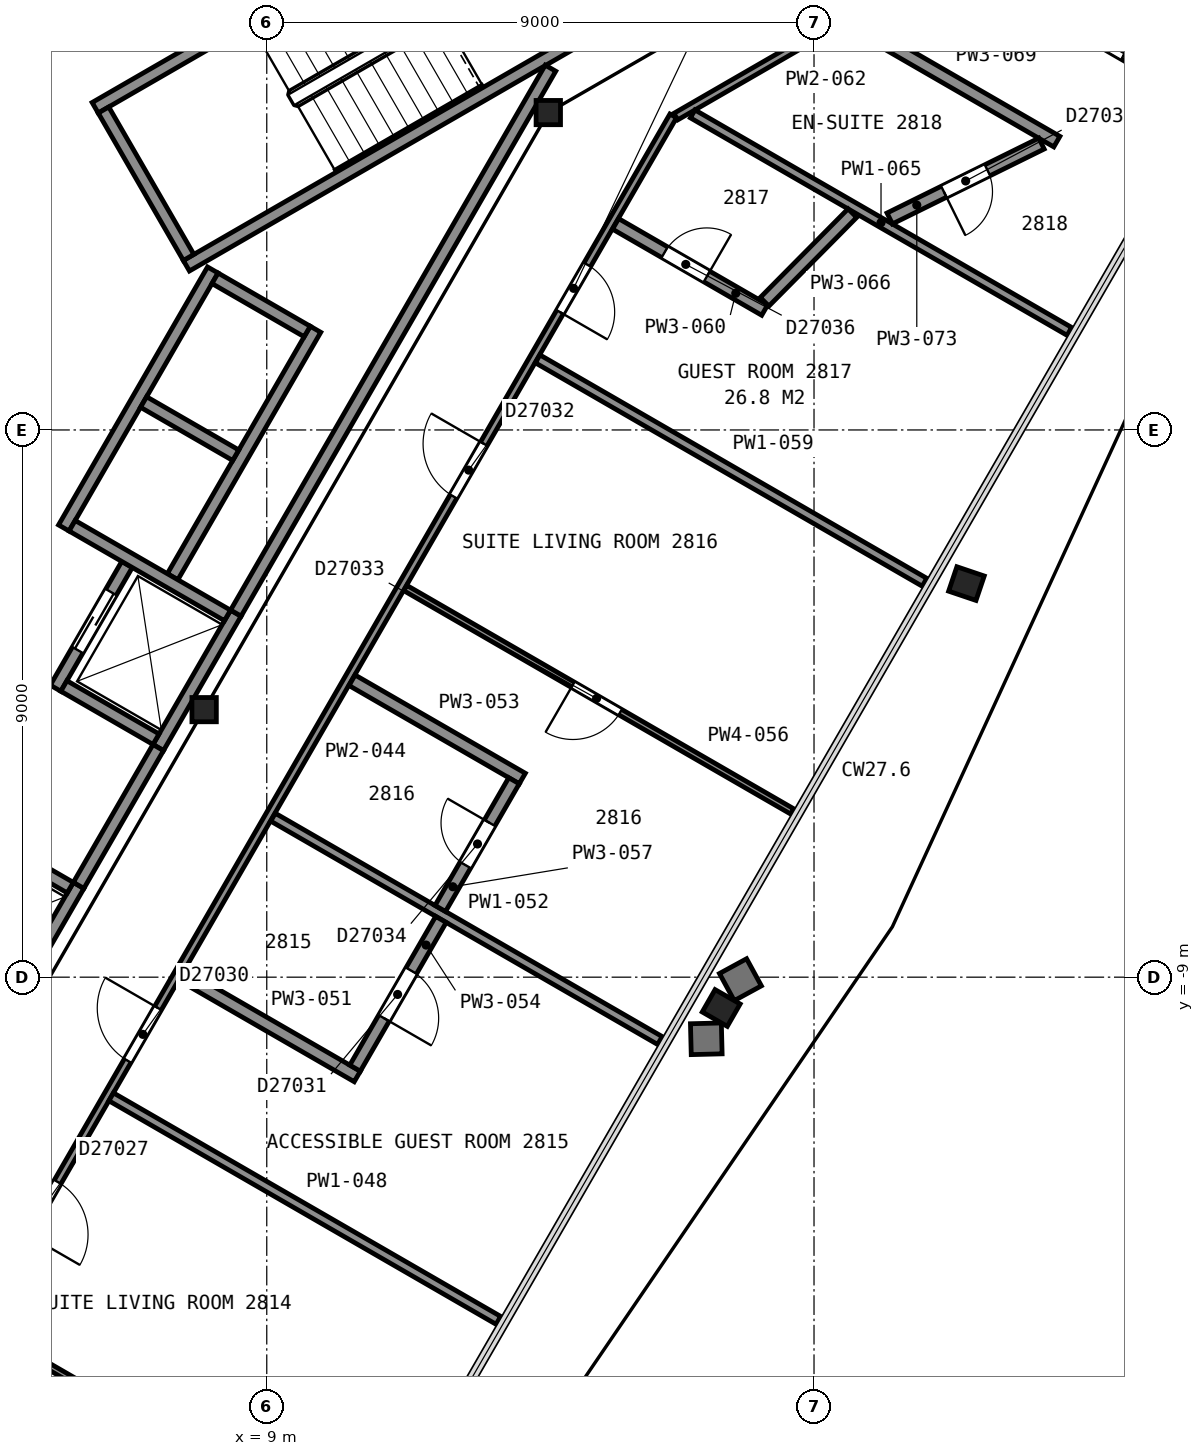
"""IFC4 building model, lengths in metres.
Left out: names, types, materials, properties, quantities, classifications, styles, units other than length and angle.
Written with IfcOpenShell. Run it as: python <this file> out.ifc"""

import sys

from ifc_helpers import new_model, si_unit, direction, frame, frame_2d, origin, origin_2d, place, context, subcontext, project, spatial, rectangle, i_section, extrude, element, fill, save


model = new_model("IFC4")
c1 = context("Model", 3, precision=1e-05, world=origin(), true_north=direction((0.0, 1.0)))
c2 = subcontext(c1, "Body", "Model", "MODEL_VIEW")
j1 = project(units=[si_unit("LENGTHUNIT", "METRE"), si_unit("PLANEANGLEUNIT", "RADIAN")], contexts=[c1])
p1 = place(None, origin())
s1 = spatial("IfcSite", under=j1, at=p1, CompositionType="ELEMENT")
p2 = place(p1, origin())
s2 = spatial("IfcBuilding", under=s1, at=p2, CompositionType="ELEMENT")
p3 = place(p2, frame((0.0, 0.0, 118.0)))
s3 = spatial("IfcBuildingStorey", under=s2, at=p3, CompositionType="ELEMENT", Elevation=118.0)
p4 = place(p3, frame((16.276, -9.393, 0.035), z_axis=(0.166300737804, -0.095436260144, 0.981445864455), x_axis=(-0.500069965347, -0.865984846123, 0.000525397431)))
e1 = element("IfcColumn", 1, at=p4, inside=s3, PredefinedType="COLUMN", context=c2, shape_type="SweptSolid", body=[
    extrude(i_section(OverallWidth=0.424, OverallDepth=0.475, WebThickness=0.048, FlangeThickness=0.077, FilletRadius=0.015, at=origin_2d()), origin(), (0.0, 0.0, 1.0), 3.597),
])
p5 = place(p3, frame((20.288, -2.453, 0.04), z_axis=(0.185215942477, -0.062645568498, 0.980699029978), x_axis=(-0.499614093352, -0.865366140596, 0.039079411895)))
e2 = element("IfcColumn", 2, at=p5, inside=s3, PredefinedType="COLUMN", context=c2, shape_type="SweptSolid", body=[
    extrude(i_section(OverallWidth=0.424, OverallDepth=0.475, WebThickness=0.048, FlangeThickness=0.077, FilletRadius=0.015, at=origin_2d()), origin(), (0.0, 0.0, 1.0), 3.589),
])
for number, where, z_axis, x_axis in (
    (3, (13.63, 5.22, 0.0), (0.0, 0.0, 1.0), (1.0, 0.0, 0.0)),
    (4, (7.97, -4.6, 0.0), (0.0, 0.0, 1.0), (1.0, 0.0, 0.0)),
):
    element("IfcColumn", number, at=place(p3, frame(where, z_axis=z_axis, x_axis=x_axis)), inside=s3, PredefinedType="COLUMN", context=c2, shape_type="SweptSolid", body=[
        extrude(i_section(OverallWidth=0.401, OverallDepth=0.399, WebThickness=0.025, FlangeThickness=0.04, FilletRadius=0.015, at=origin_2d()), origin(), (0.0, 0.0, 1.0), 3.6),
    ])
for number, where, z_axis, x_axis in (
    (5, (6.178, 5.299, 0.0), (0.0, 0.0, 1.0), (0.866, 0.5, 0.0)),
    (6, (7.678, 2.701, 0.0), (0.0, 0.0, 1.0), (0.866, 0.5, 0.0)),
):
    element("IfcWall", number, at=place(p3, frame(where, z_axis=z_axis, x_axis=x_axis)), inside=s3, PredefinedType="PARTITIONING", context=c2, shape_type="SweptSolid", body=[
        extrude(rectangle(XDim=12.0, YDim=0.2, at=frame_2d((6.0, 0.0))), origin(), (0.0, 0.0, 1.0), 3.35),
    ])
p6 = place(p3, frame((7.715, 2.838, 0.0), z_axis=(0.0, 0.0, 1.0), x_axis=(-0.500049511043, 0.865996816683, 0.0)))
e7 = element("IfcWall", 7, at=p6, inside=s3, PredefinedType="PARTITIONING", context=c2, shape_type="SweptSolid", body=[
    extrude(rectangle(XDim=2.8, YDim=0.2, at=frame_2d((1.4, 0.0))), origin(), (0.0, 0.0, 1.0), 3.35),
])
p7 = place(p3, frame((4.63, -9.7, 0.0), z_axis=(0.0, 0.0, 1.0), x_axis=(0.500062241894, 0.865989465428, 0.0)))
e8 = element("IfcWall", 8, at=p7, inside=s3, PredefinedType="PARTITIONING", context=c2, shape_type="SweptSolid", body=[
    extrude(rectangle(XDim=2.55, YDim=0.2, at=frame_2d((1.275, 0.0))), origin(), (0.0, 0.0, 1.0), 3.6),
])
p8 = place(p3, frame((7.216, -5.222, 0.0), z_axis=(0.0, 0.0, 1.0), x_axis=(0.499990435942, 0.866030925526, 0.0)))
e9 = element("IfcWall", 9, at=p8, inside=s3, PredefinedType="PARTITIONING", context=c2, shape_type="SweptSolid", body=[
    extrude(rectangle(XDim=2.55, YDim=0.2, at=frame_2d((1.275, 0.0))), origin(), (0.0, 0.0, 1.0), 3.6),
])
p9 = place(p3, frame((7.451, -2.414, 0.0), z_axis=(0.0, 0.0, 1.0), x_axis=(0.500016218704, 0.866016039709, 0.0)))
e10 = element("IfcWall", 10, at=p9, inside=s3, PredefinedType="PARTITIONING", context=c2, shape_type="SweptSolid", body=[
    extrude(rectangle(XDim=4.7, YDim=0.2, at=frame_2d((2.35, 0.0))), origin(), (0.0, 0.0, 1.0), 3.6),
])
p10 = place(p3, frame((5.527, -4.247, 0.0), z_axis=(0.0, 0.0, 1.0), x_axis=(0.499938297808, 0.866061024631, 0.0)))
e11 = element("IfcWall", 11, at=p10, inside=s3, PredefinedType="PARTITIONING", context=c2, shape_type="SweptSolid", body=[
    extrude(rectangle(XDim=2.35, YDim=0.2, at=frame_2d((1.175, 0.0))), origin(), (0.0, 0.0, 1.0), 3.6),
])
p11 = place(p10, frame((0.725, 0.0, 0.0)))
e12 = element("IfcOpeningElement", 12, at=p11, cuts=e11, PredefinedType="OPENING", context=c2, shape_type="SweptSolid", body=[
    extrude(rectangle(XDim=1.1, YDim=2.1, at=frame_2d((0.55, 1.05))), frame((0.0, 0.11, 0.0), z_axis=(0.0, -1.0, 0.0), x_axis=(1.0, 0.0, 0.0)), (0.0, 0.0, 1.0), 0.22),
])
p12 = place(p3, frame((5.663, -1.612, 0.0), z_axis=(0.0, 0.0, 1.0), x_axis=(0.49998122708, 0.866036242063, 0.0)))
e13 = element("IfcWall", 13, at=p12, inside=s3, PredefinedType="PARTITIONING", context=c2, shape_type="SweptSolid", body=[
    extrude(rectangle(XDim=4.9, YDim=0.2, at=frame_2d((2.45, 0.0))), origin(), (0.0, 0.0, 1.0), 3.6),
])
p13 = place(p3, frame((9.665, 1.62, 0.0), z_axis=(0.0, 0.0, 1.0), x_axis=(-0.866002029911, 0.500040482552, 0.0)))
e14 = element("IfcWall", 14, at=p13, inside=s3, PredefinedType="PARTITIONING", context=c2, shape_type="SweptSolid", body=[
    extrude(rectangle(XDim=1.75, YDim=0.2, at=frame_2d((0.875, 0.0))), origin(), (0.0, 0.0, 1.0), 3.6),
])
p14 = place(p3, frame((8.49, -0.416, 0.0), z_axis=(0.0, 0.0, 1.0), x_axis=(-0.866036909293, 0.499980071345, 0.0)))
e15 = element("IfcWall", 15, at=p14, inside=s3, PredefinedType="PARTITIONING", context=c2, shape_type="SweptSolid", body=[
    extrude(rectangle(XDim=1.75, YDim=0.2, at=frame_2d((0.875, 0.0))), origin(), (0.0, 0.0, 1.0), 3.6),
])
p15 = place(p3, frame((8.354, -3.051, 0.0), z_axis=(0.0, 0.0, 1.0), x_axis=(-0.866060182126, 0.499939757307, 0.0)))
e16 = element("IfcWall", 16, at=p15, inside=s3, PredefinedType="PARTITIONING", context=c2, shape_type="SweptSolid", body=[
    extrude(rectangle(XDim=2.95, YDim=0.2, at=frame_2d((1.475, 0.0))), origin(), (0.0, 0.0, 1.0), 3.6),
])
p16 = place(p3, frame((7.179, -5.086, 0.0), z_axis=(0.0, 0.0, 1.0), x_axis=(-0.866036909293, 0.499980071345, 0.0)))
e17 = element("IfcWall", 17, at=p16, inside=s3, PredefinedType="PARTITIONING", context=c2, shape_type="SweptSolid", body=[
    extrude(rectangle(XDim=1.75, YDim=0.2, at=frame_2d((0.875, 0.0))), origin(), (0.0, 0.0, 1.0), 3.6),
])
p17 = place(p3, frame((5.769, -7.528, 0.0), z_axis=(0.0, 0.0, 1.0), x_axis=(-0.866002029911, 0.500040482552, 0.0)))
e18 = element("IfcWall", 18, at=p17, inside=s3, PredefinedType="PARTITIONING", context=c2, shape_type="SweptSolid", body=[
    extrude(rectangle(XDim=1.75, YDim=0.2, at=frame_2d((0.875, 0.0))), origin(), (0.0, 0.0, 1.0), 3.6),
])
p18 = place(p3, frame((5.906, -7.49, 0.0), z_axis=(0.0, 0.0, 1.0), x_axis=(0.500252727967, 0.865879442048, 0.0)))
e19 = element("IfcWall", 19, at=p18, inside=s3, PredefinedType="PARTITIONING", context=c2, shape_type="SweptSolid", body=[
    extrude(rectangle(XDim=2.617, YDim=0.2, at=frame_2d((1.309, 0.0))), origin(), (0.0, 0.0, 1.0), 3.35),
])
p19 = place(p3, frame((8.492, -3.012, 0.0), z_axis=(0.0, 0.0, 1.0), x_axis=(0.499972957231, 0.866041016371, 0.0)))
e20 = element("IfcWall", 20, at=p19, inside=s3, PredefinedType="PARTITIONING", context=c2, shape_type="SweptSolid", body=[
    extrude(rectangle(XDim=10.349, YDim=0.2, at=frame_2d((5.174, 0.0))), origin(), (0.0, 0.0, 1.0), 3.35),
])
p20 = place(p3, frame((15.684, 5.165, 0.0), z_axis=(0.0, 0.0, 1.0), x_axis=(-0.500027787016, -0.866009360349, 0.0)))
e21 = element("IfcWall", 21, at=p20, inside=s3, PredefinedType="PARTITIONING", context=c2, shape_type="SweptSolid", body=[
    extrude(rectangle(XDim=23.856, YDim=0.125, at=frame_2d((11.928, 0.0))), origin(), (0.0, 0.0, 1.0), 2.613),
])
p21 = place(p20, frame((20.245, 0.0, 0.0)))
e22 = element("IfcOpeningElement", 22, at=p21, cuts=e21, PredefinedType="OPENING", context=c2, shape_type="SweptSolid", body=[
    extrude(rectangle(XDim=1.0, YDim=2.1, at=frame_2d((0.5, 1.05))), frame((0.0, 0.073, 0.0), z_axis=(0.0, -1.0, 0.0), x_axis=(1.0, 0.0, 0.0)), (0.0, 0.0, 1.0), 0.145),
])
p22 = place(p20, frame((16.943, 0.0, 0.0)))
e23 = element("IfcOpeningElement", 23, at=p22, cuts=e21, PredefinedType="OPENING", context=c2, shape_type="SweptSolid", body=[
    extrude(rectangle(XDim=1.0, YDim=2.1, at=frame_2d((0.5, 1.05))), frame((0.0, 0.073, 0.0), z_axis=(0.0, -1.0, 0.0), x_axis=(1.0, 0.0, 0.0)), (0.0, 0.0, 1.0), 0.145),
])
p23 = place(p20, frame((6.227, 0.0, 0.0)))
e24 = element("IfcOpeningElement", 24, at=p23, cuts=e21, PredefinedType="OPENING", context=c2, shape_type="SweptSolid", body=[
    extrude(rectangle(XDim=1.0, YDim=2.1, at=frame_2d((0.5, 1.05))), frame((0.0, 0.073, 0.0), z_axis=(0.0, -1.0, 0.0), x_axis=(1.0, 0.0, 0.0)), (0.0, 0.0, 1.0), 0.145),
])
p24 = place(p20, frame((2.825, 0.0, 0.0)))
e25 = element("IfcOpeningElement", 25, at=p24, cuts=e21, PredefinedType="OPENING", context=c2, shape_type="SweptSolid", body=[
    extrude(rectangle(XDim=0.9, YDim=2.1, at=frame_2d((0.45, 1.05))), frame((0.0, 0.073, 0.0), z_axis=(0.0, -1.0, 0.0), x_axis=(1.0, 0.0, 0.0)), (0.0, 0.0, 1.0), 0.145),
])
p25 = place(p3, frame((10.633, -18.413, 0.0), z_axis=(0.0, 0.0, 1.0), x_axis=(-0.8660606245, 0.499938990969, 0.0)))
e26 = element("IfcWall", 26, at=p25, inside=s3, PredefinedType="PARTITIONING", context=c2, shape_type="SweptSolid", body=[
    extrude(rectangle(XDim=7.353, YDim=0.1, at=frame_2d((3.676, 0.0))), origin(), (0.0, 0.0, 1.0), 2.613),
])
p26 = place(p25, frame((3.265, 0.0, 0.0)))
e27 = element("IfcOpeningElement", 27, at=p26, cuts=e26, PredefinedType="OPENING", context=c2, shape_type="SweptSolid", body=[
    extrude(rectangle(XDim=0.9, YDim=2.1, at=frame_2d((0.45, 1.05))), frame((0.0, 0.06, 0.0), z_axis=(0.0, -1.0, 0.0), x_axis=(1.0, 0.0, 0.0)), (0.0, 0.0, 1.0), 0.12),
])
p27 = place(p3, frame((6.441, -10.968, 0.0), z_axis=(0.0, 0.0, 1.0), x_axis=(0.8660606245, -0.499938990969, 0.0)))
e28 = element("IfcWall", 28, at=p27, inside=s3, PredefinedType="PARTITIONING", context=c2, shape_type="SweptSolid", body=[
    extrude(rectangle(XDim=7.353, YDim=0.15, at=frame_2d((3.676, 0.0))), origin(), (0.0, 0.0, 1.0), 2.613),
])
p28 = place(p3, frame((7.603, -8.967, 0.0), z_axis=(0.0, 0.0, 1.0), x_axis=(0.866020884234, -0.500007828009, 0.0)))
e29 = element("IfcWall", 29, at=p28, inside=s3, PredefinedType="PARTITIONING", context=c2, shape_type="SweptSolid", body=[
    extrude(rectangle(XDim=3.333, YDim=0.2, at=frame_2d((1.666, 0.0))), origin(), (0.0, 0.0, 1.0), 2.613),
])
p29 = place(p3, frame((9.103, -6.369, 0.0), z_axis=(0.0, 0.0, 1.0), x_axis=(0.866055004685, -0.499948726231, 0.0)))
e30 = element("IfcWall", 30, at=p29, inside=s3, PredefinedType="PARTITIONING", context=c2, shape_type="SweptSolid", body=[
    extrude(rectangle(XDim=7.347, YDim=0.15, at=frame_2d((3.674, 0.0))), origin(), (0.0, 0.0, 1.0), 2.613),
])
p30 = place(p3, frame((10.403, -4.117, 0.0), z_axis=(0.0, 0.0, 1.0), x_axis=(0.866078705744, -0.499907666931, 0.0)))
e31 = element("IfcWall", 31, at=p30, inside=s3, PredefinedType="PARTITIONING", context=c2, shape_type="SweptSolid", body=[
    extrude(rectangle(XDim=3.233, YDim=0.2, at=frame_2d((1.616, 0.0))), origin(), (0.0, 0.0, 1.0), 2.613),
])
p31 = place(p3, frame((10.452, -10.496, 0.0), z_axis=(0.0, 0.0, 1.0), x_axis=(0.500061596976, 0.865989837833, 0.0)))
e32 = element("IfcWall", 32, at=p31, inside=s3, PredefinedType="PARTITIONING", context=c2, shape_type="SweptSolid", body=[
    extrude(rectangle(XDim=2.825, YDim=0.2, at=frame_2d((1.413, 0.0))), origin(), (0.0, 0.0, 1.0), 2.613),
])
p32 = place(p31, frame((0.95, 0.0, 0.0)))
e33 = element("IfcOpeningElement", 33, at=p32, cuts=e32, PredefinedType="OPENING", context=c2, shape_type="SweptSolid", body=[
    extrude(rectangle(XDim=0.9, YDim=2.1, at=frame_2d((0.45, 1.05))), frame((0.0, 0.11, 0.0), z_axis=(0.0, -1.0, 0.0), x_axis=(1.0, 0.0, 0.0)), (0.0, 0.0, 1.0), 0.22),
])
p33 = place(p3, frame((17.642, -6.274, 0.0), z_axis=(0.0, 0.0, 1.0), x_axis=(-0.866003534372, 0.50003787702, 0.0)))
e34 = element("IfcWall", 34, at=p33, inside=s3, PredefinedType="PARTITIONING", context=c2, shape_type="SweptSolid", body=[
    extrude(rectangle(XDim=7.348, YDim=0.1, at=frame_2d((3.674, 0.0))), origin(), (0.0, 0.0, 1.0), 2.613),
])
p34 = place(p33, frame((3.265, 0.0, 0.0)))
e35 = element("IfcOpeningElement", 35, at=p34, cuts=e34, PredefinedType="OPENING", context=c2, shape_type="SweptSolid", body=[
    extrude(rectangle(XDim=0.9, YDim=2.1, at=frame_2d((0.45, 1.05))), frame((0.0, 0.06, 0.0), z_axis=(0.0, -1.0, 0.0), x_axis=(1.0, 0.0, 0.0)), (0.0, 0.0, 1.0), 0.12),
])
p35 = place(p3, frame((11.854, -7.87, 0.0), z_axis=(0.0, 0.0, 1.0), x_axis=(0.499885111907, 0.866091724296, 0.0)))
e36 = element("IfcWall", 36, at=p35, inside=s3, PredefinedType="PARTITIONING", context=c2, shape_type="SweptSolid", body=[
    extrude(rectangle(XDim=2.425, YDim=0.2, at=frame_2d((1.213, 0.0))), origin(), (0.0, 0.0, 1.0), 2.613),
])
p36 = place(p35, frame((0.825, 0.0, 0.0)))
e37 = element("IfcOpeningElement", 37, at=p36, cuts=e36, PredefinedType="OPENING", context=c2, shape_type="SweptSolid", body=[
    extrude(rectangle(XDim=0.8, YDim=2.1, at=frame_2d((0.4, 1.05))), frame((0.0, 0.11, 0.0), z_axis=(0.0, -1.0, 0.0), x_axis=(1.0, 0.0, 0.0)), (0.0, 0.0, 1.0), 0.22),
])
p37 = place(p3, frame((13.454, 1.169, 0.0), z_axis=(0.0, 0.0, 1.0), x_axis=(0.866011842101, -0.500023488788, 0.0)))
e38 = element("IfcWall", 38, at=p37, inside=s3, PredefinedType="PARTITIONING", context=c2, shape_type="SweptSolid", body=[
    extrude(rectangle(XDim=7.348, YDim=0.15, at=frame_2d((3.674, 0.0))), origin(), (0.0, 0.0, 1.0), 2.613),
])
p38 = place(p3, frame((14.737, 3.389, 0.0), z_axis=(0.0, 0.0, 1.0), x_axis=(0.866033446572, -0.499986069224, 0.0)))
e39 = element("IfcWall", 39, at=p38, inside=s3, PredefinedType="PARTITIONING", context=c2, shape_type="SweptSolid", body=[
    extrude(rectangle(XDim=2.833, YDim=0.2, at=frame_2d((1.416, 0.0))), origin(), (0.0, 0.0, 1.0), 2.613),
])
p39 = place(p38, frame((0.932, 0.0, 0.0)))
e40 = element("IfcOpeningElement", 40, at=p39, cuts=e39, PredefinedType="OPENING", context=c2, shape_type="SweptSolid", body=[
    extrude(rectangle(XDim=0.8, YDim=2.1, at=frame_2d((0.4, 1.05))), frame((0.0, 0.11, 0.0), z_axis=(0.0, -1.0, 0.0), x_axis=(1.0, 0.0, 0.0)), (0.0, 0.0, 1.0), 0.22),
])
p40 = place(p3, frame((15.727, 5.154, 0.0), z_axis=(0.0, 0.0, 1.0), x_axis=(0.865992261418, 0.50005739987, 0.0)))
e41 = element("IfcWall", 41, at=p40, inside=s3, PredefinedType="PARTITIONING", context=c2, shape_type="SweptSolid", body=[
    extrude(rectangle(XDim=4.101, YDim=0.125, at=frame_2d((2.051, 0.0))), origin(), (0.0, 0.0, 1.0), 2.613),
])
p41 = place(p3, frame((16.004, 5.198, 0.0), z_axis=(0.0, 0.0, 1.0), x_axis=(0.866025331845, -0.500000124603, 0.0)))
e42 = element("IfcWall", 42, at=p41, inside=s3, PredefinedType="PARTITIONING", context=c2, shape_type="SweptSolid", body=[
    extrude(rectangle(XDim=7.154, YDim=0.15, at=frame_2d((3.577, 0.0))), origin(), (0.0, 0.0, 1.0), 2.613),
])
p42 = place(p3, frame((17.188, 2.108, 0.0), z_axis=(0.0, 0.0, 1.0), x_axis=(0.703527770295, 0.710667767964, 0.0)))
e43 = element("IfcWall", 43, at=p42, inside=s3, PredefinedType="PARTITIONING", context=c2, shape_type="SweptSolid", body=[
    extrude(rectangle(XDim=2.052, YDim=0.2, at=frame_2d((1.026, 0.0))), origin(), (0.0, 0.0, 1.0), 2.613),
])
p43 = place(p3, frame((18.616, 6.692, 0.0), z_axis=(0.0, 0.0, 1.0), x_axis=(0.865984367075, -0.500071070931, 0.0)))
e44 = element("IfcWall", 44, at=p43, inside=s3, PredefinedType="PARTITIONING", context=c2, shape_type="SweptSolid", body=[
    extrude(rectangle(XDim=3.9, YDim=0.2, at=frame_2d((1.95, 0.0))), origin(), (0.0, 0.0, 1.0), 2.613),
])
p44 = place(p3, frame((19.245, 3.479, 0.0), z_axis=(0.0, 0.0, 1.0), x_axis=(0.896782684503, 0.44247126096, 0.0)))
e45 = element("IfcWall", 45, at=p44, inside=s3, PredefinedType="PARTITIONING", context=c2, shape_type="SweptSolid", body=[
    extrude(rectangle(XDim=2.784, YDim=0.2, at=frame_2d((1.392, 0.0))), origin(), (0.0, 0.0, 1.0), 2.613),
])
p45 = place(p44, frame((0.993, 0.0, 0.0)))
e46 = element("IfcOpeningElement", 46, at=p45, cuts=e45, PredefinedType="OPENING", context=c2, shape_type="SweptSolid", body=[
    extrude(rectangle(XDim=0.8, YDim=2.1, at=frame_2d((0.4, 1.05))), frame((0.0, 0.11, 0.0), z_axis=(0.0, -1.0, 0.0), x_axis=(1.0, 0.0, 0.0)), (0.0, 0.0, 1.0), 0.22),
])
p46 = place(p3, frame((24.376, 5.39, 0.0), z_axis=(0.0, 0.0, 1.0), x_axis=(-0.865974401185, 0.500088328689, 0.0)))
e47 = element("IfcWall", 47, at=p46, inside=s3, PredefinedType="PARTITIONING", context=c2, shape_type="SweptSolid", body=[
    extrude(rectangle(XDim=3.697, YDim=0.1, at=frame_2d((1.848, 0.0))), origin(), (0.0, 0.0, 1.0), 2.613),
])
p47 = place(p46, frame((1.498, 0.0, 0.0)))
e48 = element("IfcOpeningElement", 48, at=p47, cuts=e47, PredefinedType="OPENING", context=c2, shape_type="SweptSolid", body=[
    extrude(rectangle(XDim=0.9, YDim=2.1, at=frame_2d((0.45, 1.05))), frame((0.0, 0.06, 0.0), z_axis=(0.0, -1.0, 0.0), x_axis=(1.0, 0.0, 0.0)), (0.0, 0.0, 1.0), 0.12),
])
p48 = place(p11, origin())
e49 = element("IfcDoor", 49, at=p48, inside=s3, OperationType="SLIDING_TO_LEFT", PredefinedType="DOOR", context=c2, shape_type="SweptSolid", body=[
    extrude(rectangle(XDim=1.1, YDim=2.1, at=frame_2d((0.55, 1.05))), frame((0.0, 0.025, 0.0), z_axis=(0.0, -1.0, 0.0), x_axis=(1.0, 0.0, 0.0)), (0.0, 0.0, 1.0), 0.05),
])
fill(e12, e49)
p49 = place(p21, origin())
e50 = element("IfcDoor", 50, at=p49, inside=s3, OperationType="SINGLE_SWING_RIGHT", PredefinedType="DOOR", context=c2, shape_type="SweptSolid", body=[
    extrude(rectangle(XDim=1.0, YDim=2.1, at=frame_2d((0.5, 1.05))), frame((0.0, 0.025, 0.0), z_axis=(0.0, -1.0, 0.0), x_axis=(1.0, 0.0, 0.0)), (0.0, 0.0, 1.0), 0.05),
])
fill(e22, e50)
p50 = place(p22, origin())
e51 = element("IfcDoor", 51, at=p50, inside=s3, OperationType="SINGLE_SWING_LEFT", PredefinedType="DOOR", context=c2, shape_type="SweptSolid", body=[
    extrude(rectangle(XDim=1.0, YDim=2.1, at=frame_2d((0.5, 1.05))), frame((0.0, 0.025, 0.0), z_axis=(0.0, -1.0, 0.0), x_axis=(1.0, 0.0, 0.0)), (0.0, 0.0, 1.0), 0.05),
])
fill(e23, e51)
p51 = place(p23, origin())
e52 = element("IfcDoor", 52, at=p51, inside=s3, OperationType="SINGLE_SWING_LEFT", PredefinedType="DOOR", context=c2, shape_type="SweptSolid", body=[
    extrude(rectangle(XDim=1.0, YDim=2.1, at=frame_2d((0.5, 1.05))), frame((0.0, 0.025, 0.0), z_axis=(0.0, -1.0, 0.0), x_axis=(1.0, 0.0, 0.0)), (0.0, 0.0, 1.0), 0.05),
])
fill(e24, e52)
p52 = place(p24, origin())
e53 = element("IfcDoor", 53, at=p52, inside=s3, OperationType="SINGLE_SWING_RIGHT", PredefinedType="DOOR", context=c2, shape_type="SweptSolid", body=[
    extrude(rectangle(XDim=0.9, YDim=2.1, at=frame_2d((0.45, 1.05))), frame((0.0, 0.025, 0.0), z_axis=(0.0, -1.0, 0.0), x_axis=(1.0, 0.0, 0.0)), (0.0, 0.0, 1.0), 0.05),
])
fill(e25, e53)
p53 = place(p32, origin())
e54 = element("IfcDoor", 54, at=p53, inside=s3, OperationType="SINGLE_SWING_LEFT", PredefinedType="DOOR", context=c2, shape_type="SweptSolid", body=[
    extrude(rectangle(XDim=0.9, YDim=2.1, at=frame_2d((0.45, 1.05))), frame((0.0, 0.025, 0.0), z_axis=(0.0, -1.0, 0.0), x_axis=(1.0, 0.0, 0.0)), (0.0, 0.0, 1.0), 0.05),
])
fill(e33, e54)
p54 = place(p34, origin())
e55 = element("IfcDoor", 55, at=p54, inside=s3, OperationType="SINGLE_SWING_RIGHT", PredefinedType="DOOR", context=c2, shape_type="SweptSolid", body=[
    extrude(rectangle(XDim=0.9, YDim=2.1, at=frame_2d((0.45, 1.05))), frame((0.0, 0.025, 0.0), z_axis=(0.0, -1.0, 0.0), x_axis=(1.0, 0.0, 0.0)), (0.0, 0.0, 1.0), 0.05),
])
fill(e35, e55)
p55 = place(p36, origin())
e56 = element("IfcDoor", 56, at=p55, inside=s3, OperationType="SINGLE_SWING_RIGHT", PredefinedType="DOOR", context=c2, shape_type="SweptSolid", body=[
    extrude(rectangle(XDim=0.8, YDim=2.1, at=frame_2d((0.4, 1.05))), frame((0.0, 0.025, 0.0), z_axis=(0.0, -1.0, 0.0), x_axis=(1.0, 0.0, 0.0)), (0.0, 0.0, 1.0), 0.05),
])
fill(e37, e56)
p56 = place(p39, origin())
e57 = element("IfcDoor", 57, at=p56, inside=s3, OperationType="SINGLE_SWING_RIGHT", PredefinedType="DOOR", context=c2, shape_type="SweptSolid", body=[
    extrude(rectangle(XDim=0.8, YDim=2.1, at=frame_2d((0.4, 1.05))), frame((0.0, 0.025, 0.0), z_axis=(0.0, -1.0, 0.0), x_axis=(1.0, 0.0, 0.0)), (0.0, 0.0, 1.0), 0.05),
])
fill(e40, e57)
p57 = place(p45, origin())
e58 = element("IfcDoor", 58, at=p57, inside=s3, OperationType="SINGLE_SWING_LEFT", PredefinedType="DOOR", context=c2, shape_type="SweptSolid", body=[
    extrude(rectangle(XDim=0.8, YDim=2.1, at=frame_2d((0.4, 1.05))), frame((0.0, 0.025, 0.0), z_axis=(0.0, -1.0, 0.0), x_axis=(1.0, 0.0, 0.0)), (0.0, 0.0, 1.0), 0.05),
])
fill(e46, e58)
p58 = place(p47, origin())
e59 = element("IfcDoor", 59, at=p58, inside=s3, OperationType="SINGLE_SWING_LEFT", PredefinedType="DOOR", context=c2, shape_type="SweptSolid", body=[
    extrude(rectangle(XDim=0.9, YDim=2.1, at=frame_2d((0.45, 1.05))), frame((0.0, 0.025, 0.0), z_axis=(0.0, -1.0, 0.0), x_axis=(1.0, 0.0, 0.0)), (0.0, 0.0, 1.0), 0.05),
])
fill(e48, e59)
save(model, sys.argv[1])
